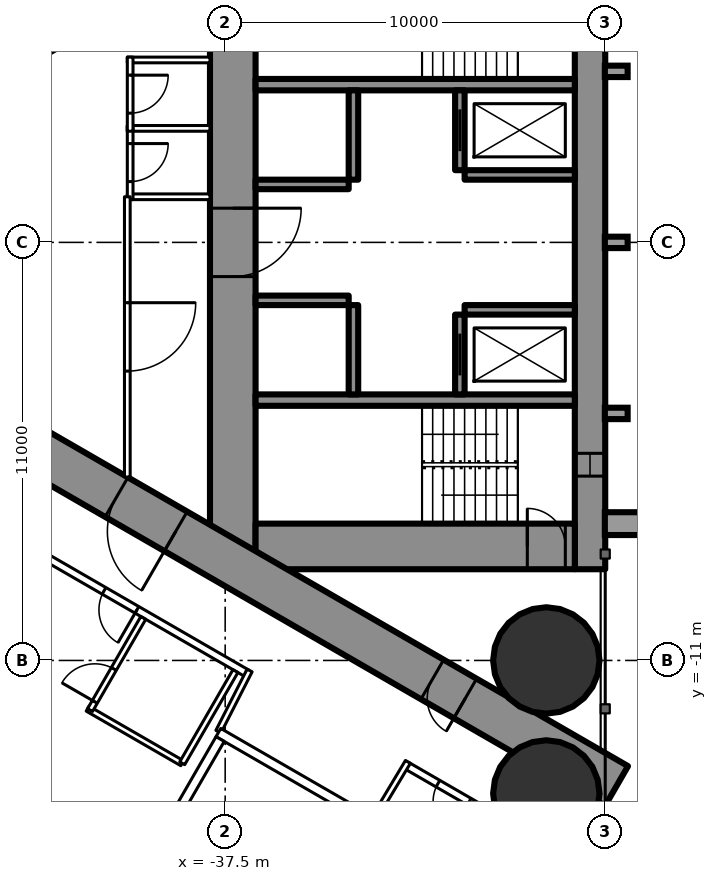
"""IFC4 building model, lengths in metres.
Left out: names, types, materials, properties, quantities, classifications, styles, units other than length and angle.
Written with IfcOpenShell. Run it as: python <this file> out.ifc"""

import sys

from ifc_helpers import new_model, si_unit, direction, frame, frame_2d, origin, origin_2d, place, context, subcontext, project, spatial, rectangle, hollow_circle, extrude, element, fill, save


model = new_model("IFC4")
c1 = context("Model", 3, precision=1e-05, world=origin(), true_north=direction((0.0, 1.0)))
c2 = subcontext(c1, "Body", "Model", "MODEL_VIEW")
j1 = project(units=[si_unit("LENGTHUNIT", "METRE"), si_unit("PLANEANGLEUNIT", "RADIAN")], contexts=[c1])
p1 = place(None, origin())
s1 = spatial("IfcSite", under=j1, at=p1, CompositionType="ELEMENT")
p2 = place(p1, origin())
s2 = spatial("IfcBuilding", under=s1, at=p2, CompositionType="ELEMENT")
p3 = place(p2, frame((0.0, 0.0, 74.0)))
s3 = spatial("IfcBuildingStorey", under=s2, at=p3, CompositionType="ELEMENT", Elevation=74.0)
for number, where, z_axis, x_axis in (
    (1, (-29.05, -11.0, 0.0), (0.0, 0.0, 1.0), (1.0, 0.0, 0.0)),
    (2, (-29.05, -14.5, 0.0), (0.0, 0.0, 1.0), (1.0, 0.0, 0.0)),
):
    element("IfcColumn", number, at=place(p3, frame(where, z_axis=z_axis, x_axis=x_axis)), inside=s3, PredefinedType="COLUMN", context=c2, shape_type="SweptSolid", body=[
        extrude(hollow_circle(Radius=1.4, WallThickness=0.12, at=origin_2d()), origin(), (0.0, 0.0, 1.0), 3.5),
    ])
p4 = place(p3, frame((-27.9, 8.6, 0.0), z_axis=(0.0, 0.0, 1.0), x_axis=(0.0, -1.0, 0.0)))
e3 = element("IfcWall", 3, at=p4, inside=s3, PredefinedType="SHEAR", context=c2, shape_type="SweptSolid", body=[
    extrude(rectangle(XDim=17.2, YDim=0.8, at=frame_2d((8.6, 0.0))), origin(), (0.0, 0.0, 1.0), 3.5),
])
p5 = place(p4, frame((2.45, 0.0, 0.6)))
e4 = element("IfcOpeningElement", 4, at=p5, cuts=e3, PredefinedType="OPENING", context=c2, shape_type="SweptSolid", body=[
    extrude(rectangle(XDim=0.6, YDim=2.1, at=frame_2d((0.3, 1.05))), frame((0.0, 0.41, 0.0), z_axis=(0.0, -1.0, 0.0), x_axis=(1.0, 0.0, 0.0)), (0.0, 0.0, 1.0), 0.82),
])
p6 = place(p4, frame((14.15, 0.0, 0.6)))
e5 = element("IfcOpeningElement", 5, at=p6, cuts=e3, PredefinedType="OPENING", context=c2, shape_type="SweptSolid", body=[
    extrude(rectangle(XDim=0.6, YDim=2.1, at=frame_2d((0.3, 1.05))), frame((0.0, 0.41, 0.0), z_axis=(0.0, -1.0, 0.0), x_axis=(1.0, 0.0, 0.0)), (0.0, 0.0, 1.0), 0.82),
])
p7 = place(p3, frame((-37.3, 8.6, 0.0), z_axis=(0.0, 0.0, 1.0), x_axis=(0.0, -1.0, 0.0)))
e6 = element("IfcWall", 6, at=p7, inside=s3, PredefinedType="SHEAR", context=c2, shape_type="SweptSolid", body=[
    extrude(rectangle(XDim=17.2, YDim=1.2, at=frame_2d((8.6, 0.0))), origin(), (0.0, 0.0, 1.0), 3.5),
])
p8 = place(p7, frame((7.7, 0.0, 0.0)))
e7 = element("IfcOpeningElement", 7, at=p8, cuts=e6, PredefinedType="OPENING", context=c2, shape_type="SweptSolid", body=[
    extrude(rectangle(XDim=1.8, YDim=2.2, at=frame_2d((0.9, 1.1))), frame((0.0, 0.61, 0.0), z_axis=(0.0, -1.0, 0.0), x_axis=(1.0, 0.0, 0.0)), (0.0, 0.0, 1.0), 1.22),
])
p9 = place(p3, frame((-28.3, -8.0, 0.0), z_axis=(0.0, 0.0, 1.0), x_axis=(-1.0, 0.0, 0.0)))
e8 = element("IfcWall", 8, at=p9, inside=s3, PredefinedType="SHEAR", context=c2, shape_type="SweptSolid", body=[
    extrude(rectangle(XDim=8.4, YDim=1.2, at=frame_2d((4.2, 0.0))), origin(), (0.0, 0.0, 1.0), 3.5),
])
p10 = place(p9, frame((0.25, 0.0, 0.0)))
e9 = element("IfcOpeningElement", 9, at=p10, cuts=e8, PredefinedType="OPENING", context=c2, shape_type="SweptSolid", body=[
    extrude(rectangle(XDim=1.0, YDim=2.2, at=frame_2d((0.5, 1.1))), frame((0.0, 0.61, 0.0), z_axis=(0.0, -1.0, 0.0), x_axis=(1.0, 0.0, 0.0)), (0.0, 0.0, 1.0), 1.22),
])
for number, where, z_axis, x_axis in (
    (10, (-28.3, 4.15, 0.0), (0.0, 0.0, 1.0), (-1.0, 0.0, 0.0)),
    (11, (-28.3, -4.15, 0.0), (0.0, 0.0, 1.0), (-1.0, 0.0, 0.0)),
):
    element("IfcWall", number, at=place(p3, frame(where, z_axis=z_axis, x_axis=x_axis)), inside=s3, PredefinedType="SHEAR", context=c2, shape_type="SweptSolid", body=[
        extrude(rectangle(XDim=8.4, YDim=0.3, at=frame_2d((4.2, 0.0))), origin(), (0.0, 0.0, 1.0), 3.5),
    ])
p11 = place(p3, frame((-31.325, 4.0, 0.0), z_axis=(0.0, 0.0, 1.0), x_axis=(0.0, -1.0, 0.0)))
e12 = element("IfcWall", 12, at=p11, inside=s3, PredefinedType="SHEAR", context=c2, shape_type="SweptSolid", body=[
    extrude(rectangle(XDim=2.1, YDim=0.25, at=frame_2d((1.05, 0.0))), origin(), (0.0, 0.0, 1.0), 3.5),
])
p12 = place(p11, frame((0.5, 0.0, 0.0)))
e13 = element("IfcOpeningElement", 13, at=p12, cuts=e12, PredefinedType="OPENING", context=c2, shape_type="SweptSolid", body=[
    extrude(rectangle(XDim=1.1, YDim=2.2, at=frame_2d((0.55, 1.1))), frame((0.0, 0.135, 0.0), z_axis=(0.0, -1.0, 0.0), x_axis=(1.0, 0.0, 0.0)), (0.0, 0.0, 1.0), 0.27),
])
p13 = place(p3, frame((-34.125, 4.0, 0.0), z_axis=(0.0, 0.0, 1.0), x_axis=(0.0, -1.0, 0.0)))
e14 = element("IfcWall", 14, at=p13, inside=s3, PredefinedType="SHEAR", context=c2, shape_type="SweptSolid", body=[
    extrude(rectangle(XDim=2.35, YDim=0.25, at=frame_2d((1.175, 0.0))), origin(), (0.0, 0.0, 1.0), 3.5),
])
p14 = place(p3, frame((-28.3, 1.775, 0.0), z_axis=(0.0, 0.0, 1.0), x_axis=(-1.0, 0.0, 0.0)))
e15 = element("IfcWall", 15, at=p14, inside=s3, PredefinedType="SHEAR", context=c2, shape_type="SweptSolid", body=[
    extrude(rectangle(XDim=2.9, YDim=0.25, at=frame_2d((1.45, 0.0))), origin(), (0.0, 0.0, 1.0), 3.5),
])
p15 = place(p3, frame((-34.25, 1.525, 0.0), z_axis=(0.0, 0.0, 1.0), x_axis=(-1.0, 0.0, 0.0)))
e16 = element("IfcWall", 16, at=p15, inside=s3, PredefinedType="SHEAR", context=c2, shape_type="SweptSolid", body=[
    extrude(rectangle(XDim=2.45, YDim=0.25, at=frame_2d((1.225, 0.0))), origin(), (0.0, 0.0, 1.0), 3.5),
])
p16 = place(p3, frame((-31.325, -1.9, 0.0), z_axis=(0.0, 0.0, 1.0), x_axis=(0.0, -1.0, 0.0)))
e17 = element("IfcWall", 17, at=p16, inside=s3, PredefinedType="SHEAR", context=c2, shape_type="SweptSolid", body=[
    extrude(rectangle(XDim=2.1, YDim=0.25, at=frame_2d((1.05, 0.0))), origin(), (0.0, 0.0, 1.0), 3.5),
])
p17 = place(p16, frame((0.5, 0.0, 0.0)))
e18 = element("IfcOpeningElement", 18, at=p17, cuts=e17, PredefinedType="OPENING", context=c2, shape_type="SweptSolid", body=[
    extrude(rectangle(XDim=1.1, YDim=2.2, at=frame_2d((0.55, 1.1))), frame((0.0, 0.135, 0.0), z_axis=(0.0, -1.0, 0.0), x_axis=(1.0, 0.0, 0.0)), (0.0, 0.0, 1.0), 0.27),
])
p18 = place(p3, frame((-34.125, -1.65, 0.0), z_axis=(0.0, 0.0, 1.0), x_axis=(0.0, -1.0, 0.0)))
e19 = element("IfcWall", 19, at=p18, inside=s3, PredefinedType="SHEAR", context=c2, shape_type="SweptSolid", body=[
    extrude(rectangle(XDim=2.35, YDim=0.25, at=frame_2d((1.175, 0.0))), origin(), (0.0, 0.0, 1.0), 3.5),
])
p19 = place(p3, frame((-28.3, -1.775, 0.0), z_axis=(0.0, 0.0, 1.0), x_axis=(-1.0, 0.0, 0.0)))
e20 = element("IfcWall", 20, at=p19, inside=s3, PredefinedType="SHEAR", context=c2, shape_type="SweptSolid", body=[
    extrude(rectangle(XDim=2.9, YDim=0.25, at=frame_2d((1.45, 0.0))), origin(), (0.0, 0.0, 1.0), 3.5),
])
p20 = place(p3, frame((-34.25, -1.525, 0.0), z_axis=(0.0, 0.0, 1.0), x_axis=(-1.0, 0.0, 0.0)))
e21 = element("IfcWall", 21, at=p20, inside=s3, PredefinedType="SHEAR", context=c2, shape_type="SweptSolid", body=[
    extrude(rectangle(XDim=2.45, YDim=0.25, at=frame_2d((1.225, 0.0))), origin(), (0.0, 0.0, 1.0), 3.5),
])
p21 = place(p3, frame((-27.2, 14.3, 0.0), z_axis=(0.0, 0.0, 1.0), x_axis=(-0.866026593062, -0.499997940104, 0.0)))
e22 = element("IfcWall", 22, at=p21, inside=s3, PredefinedType="SHEAR", context=c2, shape_type="SweptSolid", body=[
    extrude(rectangle(XDim=28.946, YDim=1.2, at=frame_2d((14.473, 0.0))), origin(), (0.0, 0.0, 1.0), 3.5),
])
p22 = place(p21, frame((4.6, 0.0, 0.0)))
e23 = element("IfcOpeningElement", 23, at=p22, cuts=e22, PredefinedType="OPENING", context=c2, shape_type="SweptSolid", body=[
    extrude(rectangle(XDim=1.0, YDim=2.2, at=frame_2d((0.5, 1.1))), frame((0.0, 0.61, 0.0), z_axis=(0.0, -1.0, 0.0), x_axis=(1.0, 0.0, 0.0)), (0.0, 0.0, 1.0), 1.22),
])
p23 = place(p21, frame((13.395, 0.0, 0.0)))
e24 = element("IfcOpeningElement", 24, at=p23, cuts=e22, PredefinedType="OPENING", context=c2, shape_type="SweptSolid", body=[
    extrude(rectangle(XDim=1.8, YDim=2.2, at=frame_2d((0.9, 1.1))), frame((0.0, 0.61, 0.0), z_axis=(0.0, -1.0, 0.0), x_axis=(1.0, 0.0, 0.0)), (0.0, 0.0, 1.0), 1.22),
])
p24 = place(p3, frame((-27.2, -14.3, 0.0), z_axis=(0.0, 0.0, 1.0), x_axis=(-0.866024021859, 0.500002393557, 0.0)))
e25 = element("IfcWall", 25, at=p24, inside=s3, PredefinedType="SHEAR", context=c2, shape_type="SweptSolid", body=[
    extrude(rectangle(XDim=27.907, YDim=1.2, at=frame_2d((13.954, 0.0))), origin(), (0.0, 0.0, 1.0), 3.5),
])
p25 = place(p24, frame((4.6, 0.0, 0.0)))
e26 = element("IfcOpeningElement", 26, at=p25, cuts=e25, PredefinedType="OPENING", context=c2, shape_type="SweptSolid", body=[
    extrude(rectangle(XDim=1.0, YDim=2.2, at=frame_2d((0.5, 1.1))), frame((0.0, 0.61, 0.0), z_axis=(0.0, -1.0, 0.0), x_axis=(1.0, 0.0, 0.0)), (0.0, 0.0, 1.0), 1.22),
])
p26 = place(p24, frame((13.395, 0.0, 0.0)))
e27 = element("IfcOpeningElement", 27, at=p26, cuts=e25, PredefinedType="OPENING", context=c2, shape_type="SweptSolid", body=[
    extrude(rectangle(XDim=1.8, YDim=2.2, at=frame_2d((0.9, 1.1))), frame((0.0, 0.61, 0.0), z_axis=(0.0, -1.0, 0.0), x_axis=(1.0, 0.0, 0.0)), (0.0, 0.0, 1.0), 1.22),
])
p27 = place(p3, frame((-27.572, -16.741, 0.0), z_axis=(0.0, 0.0, 1.0), x_axis=(-0.866024464444, 0.500001626982, 0.0)))
e28 = element("IfcWall", 28, at=p27, inside=s3, PredefinedType="PARTITIONING", context=c2, shape_type="SweptSolid", body=[
    extrude(rectangle(XDim=5.955, YDim=0.2, at=frame_2d((2.978, 0.0))), origin(), (0.0, 0.0, 1.0), 3.25),
])
p28 = place(p27, frame((4.05, 0.0, 0.0)))
e29 = element("IfcOpeningElement", 29, at=p28, cuts=e28, PredefinedType="OPENING", context=c2, shape_type="SweptSolid", body=[
    extrude(rectangle(XDim=0.95, YDim=2.2, at=frame_2d((0.475, 1.1))), frame((0.0, 0.11, 0.0), z_axis=(0.0, -1.0, 0.0), x_axis=(1.0, 0.0, 0.0)), (0.0, 0.0, 1.0), 0.22),
])
p29 = place(p3, frame((-36.92, -11.344, 0.0), z_axis=(0.0, 0.0, 1.0), x_axis=(-0.866028313256, 0.499994960614, 0.0)))
e30 = element("IfcWall", 30, at=p29, inside=s3, PredefinedType="PARTITIONING", context=c2, shape_type="SweptSolid", body=[
    extrude(rectangle(XDim=22.568, YDim=0.2, at=frame_2d((11.284, 0.0))), origin(), (0.0, 0.0, 1.0), 3.25),
])
p30 = place(p29, frame((20.958, 0.0, 0.0)))
e31 = element("IfcOpeningElement", 31, at=p30, cuts=e30, PredefinedType="OPENING", context=c2, shape_type="SweptSolid", body=[
    extrude(rectangle(XDim=0.95, YDim=2.2, at=frame_2d((0.475, 1.1))), frame((0.0, 0.11, 0.0), z_axis=(0.0, -1.0, 0.0), x_axis=(1.0, 0.0, 0.0)), (0.0, 0.0, 1.0), 0.22),
])
p31 = place(p29, frame((12.68, 0.0, 0.0)))
e32 = element("IfcOpeningElement", 32, at=p31, cuts=e30, PredefinedType="OPENING", context=c2, shape_type="SweptSolid", body=[
    extrude(rectangle(XDim=0.95, YDim=2.2, at=frame_2d((0.475, 1.1))), frame((0.0, 0.11, 0.0), z_axis=(0.0, -1.0, 0.0), x_axis=(1.0, 0.0, 0.0)), (0.0, 0.0, 1.0), 0.22),
])
p32 = place(p29, frame((3.35, 0.0, 0.0)))
e33 = element("IfcOpeningElement", 33, at=p32, cuts=e30, PredefinedType="OPENING", context=c2, shape_type="SweptSolid", body=[
    extrude(rectangle(XDim=1.0, YDim=2.2, at=frame_2d((0.5, 1.1))), frame((0.0, 0.11, 0.0), z_axis=(0.0, -1.0, 0.0), x_axis=(1.0, 0.0, 0.0)), (0.0, 0.0, 1.0), 0.22),
])
p33 = place(p3, frame((-36.857, -11.265, 0.0), z_axis=(0.0, 0.0, 1.0), x_axis=(-0.454225294761, -0.890886851176, 0.0)))
e34 = element("IfcWall", 34, at=p33, inside=s3, PredefinedType="PARTITIONING", context=c2, shape_type="SweptSolid", body=[
    extrude(rectangle(XDim=1.807, YDim=0.15, at=frame_2d((0.904, 0.0))), origin(), (0.0, 0.0, 1.0), 3.25),
])
p34 = place(p3, frame((-33.621, -15.218, 0.0), z_axis=(0.0, 0.0, 1.0), x_axis=(0.514336634837, 0.857588377991, 0.0)))
e35 = element("IfcWall", 35, at=p34, inside=s3, PredefinedType="PARTITIONING", context=c2, shape_type="SweptSolid", body=[
    extrude(rectangle(XDim=1.805, YDim=0.15, at=frame_2d((0.903, 0.0))), origin(), (0.0, 0.0, 1.0), 3.25),
])
p35 = place(p3, frame((-38.63, -13.705, 0.0), z_axis=(0.0, 0.0, 1.0), x_axis=(-0.866018712932, 0.500011588718, 0.0)))
e36 = element("IfcWall", 36, at=p35, inside=s3, PredefinedType="PARTITIONING", context=c2, shape_type="SweptSolid", body=[
    extrude(rectangle(XDim=2.875, YDim=0.15, at=frame_2d((1.438, 0.0))), origin(), (0.0, 0.0, 1.0), 3.25),
])
p36 = place(p3, frame((-39.655, -9.88, 0.0), z_axis=(0.0, 0.0, 1.0), x_axis=(-0.500049511043, -0.865996816683, 0.0)))
e37 = element("IfcWall", 37, at=p36, inside=s3, PredefinedType="PARTITIONING", context=c2, shape_type="SweptSolid", body=[
    extrude(rectangle(XDim=2.8, YDim=0.15, at=frame_2d((1.4, 0.0))), origin(), (0.0, 0.0, 1.0), 3.25),
])
p37 = place(p36, frame((1.55, 0.0, 0.0)))
e38 = element("IfcOpeningElement", 38, at=p37, cuts=e37, PredefinedType="OPENING", context=c2, shape_type="SweptSolid", body=[
    extrude(rectangle(XDim=1.0, YDim=2.2, at=frame_2d((0.5, 1.1))), frame((0.0, 0.085, 0.0), z_axis=(0.0, -1.0, 0.0), x_axis=(1.0, 0.0, 0.0)), (0.0, 0.0, 1.0), 0.17),
])
p38 = place(p3, frame((-37.23, -11.281, 0.0), z_axis=(0.0, 0.0, 1.0), x_axis=(-0.500049511043, -0.865996816683, 0.0)))
e39 = element("IfcWall", 39, at=p38, inside=s3, PredefinedType="PARTITIONING", context=c2, shape_type="SweptSolid", body=[
    extrude(rectangle(XDim=2.8, YDim=0.15, at=frame_2d((1.4, 0.0))), origin(), (0.0, 0.0, 1.0), 3.25),
])
for number, where, z_axis, x_axis in (
    (40, (-37.9, 1.2, 0.0), (0.0, 0.0, 1.0), (-1.0, 0.0, 0.0)),
    (41, (-37.9, 3.0, 0.0), (0.0, 0.0, 1.0), (-1.0, 0.0, 0.0)),
    (42, (-37.9, 4.8, 0.0), (0.0, 0.0, 1.0), (-1.0, 0.0, 0.0)),
):
    element("IfcWall", number, at=place(p3, frame(where, z_axis=z_axis, x_axis=x_axis)), inside=s3, PredefinedType="PARTITIONING", context=c2, shape_type="SweptSolid", body=[
        extrude(rectangle(XDim=2.175, YDim=0.15, at=frame_2d((1.087, 0.0))), origin(), (0.0, 0.0, 1.0), 3.25),
    ])
p39 = place(p3, frame((-40.0, 3.075, 0.0), z_axis=(0.0, 0.0, 1.0), x_axis=(0.0, -1.0, 0.0)))
e43 = element("IfcWall", 43, at=p39, inside=s3, PredefinedType="PARTITIONING", context=c2, shape_type="SweptSolid", body=[
    extrude(rectangle(XDim=1.95, YDim=0.15, at=frame_2d((0.975, 0.0))), origin(), (0.0, 0.0, 1.0), 3.25),
])
p40 = place(p39, frame((0.475, 0.0, 0.0)))
e44 = element("IfcOpeningElement", 44, at=p40, cuts=e43, PredefinedType="OPENING", context=c2, shape_type="SweptSolid", body=[
    extrude(rectangle(XDim=1.0, YDim=2.2, at=frame_2d((0.5, 1.1))), frame((0.0, 0.085, 0.0), z_axis=(0.0, -1.0, 0.0), x_axis=(1.0, 0.0, 0.0)), (0.0, 0.0, 1.0), 0.17),
])
p41 = place(p3, frame((-40.0, 4.875, 0.0), z_axis=(0.0, 0.0, 1.0), x_axis=(0.0, -1.0, 0.0)))
e45 = element("IfcWall", 45, at=p41, inside=s3, PredefinedType="PARTITIONING", context=c2, shape_type="SweptSolid", body=[
    extrude(rectangle(XDim=1.95, YDim=0.15, at=frame_2d((0.975, 0.0))), origin(), (0.0, 0.0, 1.0), 3.25),
])
p42 = place(p41, frame((0.475, 0.0, 0.0)))
e46 = element("IfcOpeningElement", 46, at=p42, cuts=e45, PredefinedType="OPENING", context=c2, shape_type="SweptSolid", body=[
    extrude(rectangle(XDim=1.0, YDim=2.2, at=frame_2d((0.5, 1.1))), frame((0.0, 0.085, 0.0), z_axis=(0.0, -1.0, 0.0), x_axis=(1.0, 0.0, 0.0)), (0.0, 0.0, 1.0), 0.17),
])
p43 = place(p3, frame((-40.075, 1.2, 0.0), z_axis=(0.0, 0.0, 1.0), x_axis=(0.0, -1.0, 0.0)))
e47 = element("IfcWall", 47, at=p43, inside=s3, PredefinedType="PARTITIONING", context=c2, shape_type="SweptSolid", body=[
    extrude(rectangle(XDim=7.374, YDim=0.15, at=frame_2d((3.687, 0.0))), origin(), (0.0, 0.0, 1.0), 3.25),
])
p44 = place(p43, frame((2.787, 0.0, 0.0)))
e48 = element("IfcOpeningElement", 48, at=p44, cuts=e47, PredefinedType="OPENING", context=c2, shape_type="SweptSolid", body=[
    extrude(rectangle(XDim=1.8, YDim=2.2, at=frame_2d((0.9, 1.1))), frame((0.0, 0.085, 0.0), z_axis=(0.0, -1.0, 0.0), x_axis=(1.0, 0.0, 0.0)), (0.0, 0.0, 1.0), 0.17),
])
p45 = place(p3, frame((-33.696, -15.197, 0.0), z_axis=(0.0, 0.0, 1.0), x_axis=(-0.865976953817, 0.500083908417, 0.0)))
e49 = element("IfcWall", 49, at=p45, inside=s3, PredefinedType="PARTITIONING", context=c2, shape_type="SweptSolid", body=[
    extrude(rectangle(XDim=4.599, YDim=0.25, at=frame_2d((2.3, 0.0))), origin(), (0.0, 0.0, 1.0), 3.25),
])
p46 = place(p3, frame((-37.633, -13.068, 0.0), z_axis=(0.0, 0.0, 1.0), x_axis=(-0.499872130319, -0.866099216793, 0.0)))
e50 = element("IfcWall", 50, at=p46, inside=s3, PredefinedType="PARTITIONING", context=c2, shape_type="SweptSolid", body=[
    extrude(rectangle(XDim=3.2, YDim=0.25, at=frame_2d((1.6, 0.0))), origin(), (0.0, 0.0, 1.0), 3.25),
])
p47 = place(p37, origin())
e51 = element("IfcDoor", 51, at=p47, inside=s3, OperationType="SINGLE_SWING_RIGHT", PredefinedType="DOOR", context=c2, shape_type="SweptSolid", body=[
    extrude(rectangle(XDim=1.0, YDim=2.2, at=frame_2d((0.5, 1.1))), frame((0.0, 0.025, 0.0), z_axis=(0.0, -1.0, 0.0), x_axis=(1.0, 0.0, 0.0)), (0.0, 0.0, 1.0), 0.05),
])
fill(e38, e51)
p48 = place(p32, origin())
e52 = element("IfcDoor", 52, at=p48, inside=s3, OperationType="SINGLE_SWING_LEFT", PredefinedType="DOOR", context=c2, shape_type="SweptSolid", body=[
    extrude(rectangle(XDim=1.0, YDim=2.2, at=frame_2d((0.5, 1.1))), frame((0.0, 0.025, 0.0), z_axis=(0.0, -1.0, 0.0), x_axis=(1.0, 0.0, 0.0)), (0.0, 0.0, 1.0), 0.05),
])
fill(e33, e52)
p49 = place(p28, origin())
e53 = element("IfcDoor", 53, at=p49, inside=s3, OperationType="SINGLE_SWING_LEFT", PredefinedType="DOOR", context=c2, shape_type="SweptSolid", body=[
    extrude(rectangle(XDim=0.95, YDim=2.2, at=frame_2d((0.475, 1.1))), frame((0.0, 0.025, 0.0), z_axis=(0.0, -1.0, 0.0), x_axis=(1.0, 0.0, 0.0)), (0.0, 0.0, 1.0), 0.05),
])
fill(e29, e53)
p50 = place(p40, origin())
e54 = element("IfcDoor", 54, at=p50, inside=s3, OperationType="SINGLE_SWING_LEFT", PredefinedType="DOOR", context=c2, shape_type="SweptSolid", body=[
    extrude(rectangle(XDim=1.0, YDim=2.2, at=frame_2d((0.5, 1.1))), frame((0.0, 0.025, 0.0), z_axis=(0.0, -1.0, 0.0), x_axis=(1.0, 0.0, 0.0)), (0.0, 0.0, 1.0), 0.05),
])
fill(e44, e54)
p51 = place(p42, origin())
e55 = element("IfcDoor", 55, at=p51, inside=s3, OperationType="SINGLE_SWING_LEFT", PredefinedType="DOOR", context=c2, shape_type="SweptSolid", body=[
    extrude(rectangle(XDim=1.0, YDim=2.2, at=frame_2d((0.5, 1.1))), frame((0.0, 0.025, 0.0), z_axis=(0.0, -1.0, 0.0), x_axis=(1.0, 0.0, 0.0)), (0.0, 0.0, 1.0), 0.05),
])
fill(e46, e55)
p52 = place(p44, origin())
e56 = element("IfcDoor", 56, at=p52, inside=s3, OperationType="DOUBLE_DOOR_SINGLE_SWING", PredefinedType="DOOR", context=c2, shape_type="SweptSolid", body=[
    extrude(rectangle(XDim=1.8, YDim=2.2, at=frame_2d((0.9, 1.1))), frame((0.0, 0.025, 0.0), z_axis=(0.0, -1.0, 0.0), x_axis=(1.0, 0.0, 0.0)), (0.0, 0.0, 1.0), 0.05),
])
fill(e48, e56)
p53 = place(p25, origin())
e57 = element("IfcDoor", 57, at=p53, inside=s3, OperationType="SINGLE_SWING_LEFT", PredefinedType="DOOR", context=c2, shape_type="SweptSolid", body=[
    extrude(rectangle(XDim=1.0, YDim=2.2, at=frame_2d((0.5, 1.1))), frame((0.0, 0.025, 0.0), z_axis=(0.0, -1.0, 0.0), x_axis=(1.0, 0.0, 0.0)), (0.0, 0.0, 1.0), 0.05),
])
fill(e26, e57)
p54 = place(p26, origin())
e58 = element("IfcDoor", 58, at=p54, inside=s3, OperationType="DOUBLE_DOOR_SINGLE_SWING", PredefinedType="DOOR", context=c2, shape_type="SweptSolid", body=[
    extrude(rectangle(XDim=1.8, YDim=2.2, at=frame_2d((0.9, 1.1))), frame((0.0, 0.025, 0.0), z_axis=(0.0, -1.0, 0.0), x_axis=(1.0, 0.0, 0.0)), (0.0, 0.0, 1.0), 0.05),
])
fill(e27, e58)
p55 = place(p8, origin())
e59 = element("IfcDoor", 59, at=p55, inside=s3, OperationType="DOUBLE_DOOR_SINGLE_SWING", PredefinedType="DOOR", context=c2, shape_type="SweptSolid", body=[
    extrude(rectangle(XDim=1.8, YDim=2.2, at=frame_2d((0.9, 1.1))), frame((0.0, 0.025, 0.0), z_axis=(0.0, -1.0, 0.0), x_axis=(1.0, 0.0, 0.0)), (0.0, 0.0, 1.0), 0.05),
])
fill(e7, e59)
p56 = place(p10, origin())
e60 = element("IfcDoor", 60, at=p56, inside=s3, OperationType="SINGLE_SWING_RIGHT", PredefinedType="DOOR", context=c2, shape_type="SweptSolid", body=[
    extrude(rectangle(XDim=1.0, YDim=2.2, at=frame_2d((0.5, 1.1))), frame((0.0, 0.025, 0.0), z_axis=(0.0, -1.0, 0.0), x_axis=(1.0, 0.0, 0.0)), (0.0, 0.0, 1.0), 0.05),
])
fill(e9, e60)
p57 = place(p12, origin())
e61 = element("IfcDoor", 61, at=p57, inside=s3, OperationType="SLIDING_TO_LEFT", PredefinedType="USERDEFINED", context=c2, shape_type="SweptSolid", body=[
    extrude(rectangle(XDim=1.1, YDim=2.2, at=frame_2d((0.55, 1.1))), frame((0.0, 0.025, 0.0), z_axis=(0.0, -1.0, 0.0), x_axis=(1.0, 0.0, 0.0)), (0.0, 0.0, 1.0), 0.05),
])
fill(e13, e61)
p58 = place(p17, origin())
e62 = element("IfcDoor", 62, at=p58, inside=s3, OperationType="SLIDING_TO_LEFT", PredefinedType="USERDEFINED", context=c2, shape_type="SweptSolid", body=[
    extrude(rectangle(XDim=1.1, YDim=2.2, at=frame_2d((0.55, 1.1))), frame((0.0, 0.025, 0.0), z_axis=(0.0, -1.0, 0.0), x_axis=(1.0, 0.0, 0.0)), (0.0, 0.0, 1.0), 0.05),
])
fill(e18, e62)
p59 = place(p6, origin())
e63 = element("IfcWindow", 63, at=p59, inside=s3, PartitioningType="SINGLE_PANEL", PredefinedType="WINDOW", context=c2, shape_type="SweptSolid", body=[
    extrude(rectangle(XDim=0.6, YDim=2.1, at=frame_2d((0.3, 1.05))), frame((0.0, 0.03, 0.0), z_axis=(0.0, -1.0, 0.0), x_axis=(1.0, 0.0, 0.0)), (0.0, 0.0, 1.0), 0.06),
])
fill(e5, e63)
save(model, sys.argv[1])
